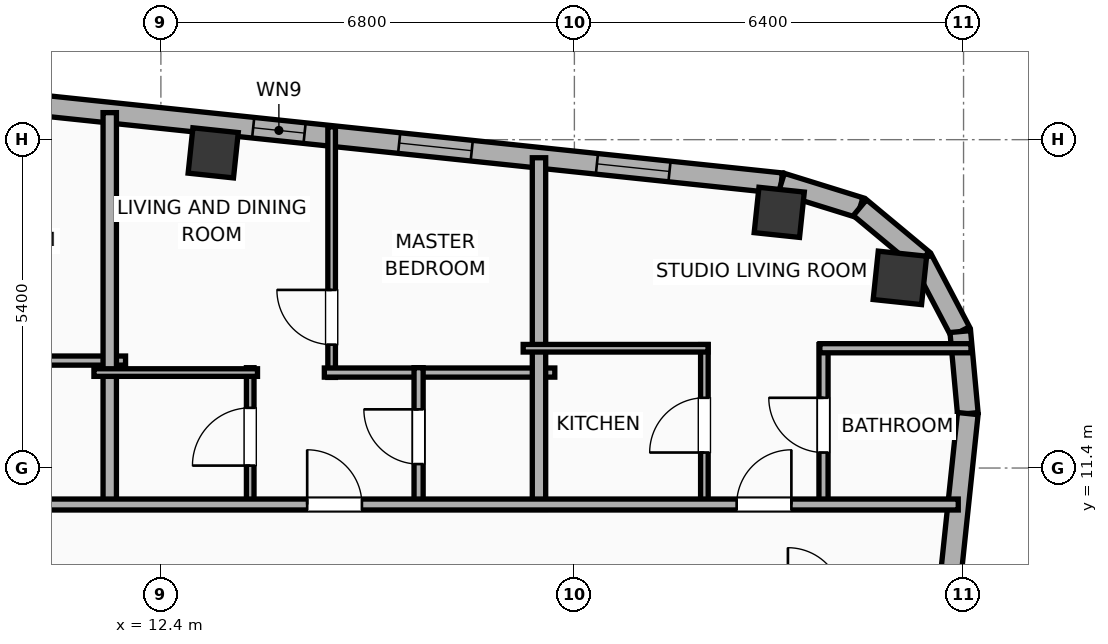
"""IFC4 building model, lengths in metres.
Left out: names, types, materials, properties, quantities, classifications, styles, units other than length and angle.
Written with IfcOpenShell. Run it as: python <this file> out.ifc"""

import sys

from ifc_helpers import new_model, si_unit, direction, frame, frame_2d, origin, origin_2d, place, context, subcontext, project, spatial, rectangle, hollow_rectangle, hollow_circle, extrude, element, fill, save


model = new_model("IFC4")
c1 = context("Model", 3, precision=1e-05, world=origin(), true_north=direction((0.0, 1.0)))
c2 = subcontext(c1, "Body", "Model", "MODEL_VIEW")
j1 = project(units=[si_unit("LENGTHUNIT", "METRE"), si_unit("PLANEANGLEUNIT", "RADIAN")], contexts=[c1])
p1 = place(None, origin())
s1 = spatial("IfcSite", under=j1, at=p1, CompositionType="ELEMENT")
p2 = place(p1, origin())
s2 = spatial("IfcBuilding", under=s1, at=p2, CompositionType="ELEMENT")
p3 = place(p2, frame((0.0, 0.0, 275.6)))
s3 = spatial("IfcBuildingStorey", under=s2, at=p3, CompositionType="ELEMENT", Elevation=275.6)
p4 = place(p3, frame((24.553, 14.527, 0.0), z_axis=(0.0, 0.0, 1.0), x_axis=(0.994521895368, -0.104528463268, 0.0)))
e1 = element("IfcColumn", 1, at=p4, inside=s3, PredefinedType="COLUMN", context=c2, shape_type="SweptSolid", body=[
    extrude(hollow_circle(Radius=0.4, WallThickness=0.028, at=origin_2d()), origin(), (0.0, 0.0, 1.0), 3.9),
])
for number, where, z_axis, x_axis in (
    (2, (22.569, 15.604, 0.0), (0.0, 0.0, 1.0), (0.995, -0.105, 0.0)),
    (3, (13.26, 16.583, 0.0), (0.0, 0.0, 1.0), (0.995, -0.105, 0.0)),
):
    element("IfcColumn", number, at=place(p3, frame(where, z_axis=z_axis, x_axis=x_axis)), inside=s3, PredefinedType="COLUMN", context=c2, shape_type="SweptSolid", body=[
        extrude(hollow_rectangle(XDim=0.75, YDim=0.75, WallThickness=0.025, at=origin_2d()), origin(), (0.0, 0.0, 1.0), 3.9),
    ])
p5 = place(p3, frame((6.789, 17.746, 0.0), z_axis=(0.0, 0.0, 1.0), x_axis=(0.994521594531, -0.104531325504, 0.0)))
e4 = element("IfcWall", 4, at=p5, inside=s3, PredefinedType="ELEMENTEDWALL", context=c2, shape_type="SweptSolid", body=[
    extrude(rectangle(XDim=15.901, YDim=0.34, at=frame_2d((7.95, 0.0))), origin(), (0.0, 0.0, 1.0), 3.65),
])
p6 = place(p5, frame((2.484, 0.0, 0.75)))
e5 = element("IfcOpeningElement", 5, at=p6, cuts=e4, PredefinedType="OPENING", context=c2, shape_type="SweptSolid", body=[
    extrude(rectangle(XDim=1.2, YDim=2.05, at=frame_2d((0.6, 1.025))), frame((0.0, 0.18, 0.0), z_axis=(0.0, -1.0, 0.0), x_axis=(1.0, 0.0, 0.0)), (0.0, 0.0, 1.0), 0.36),
])
p7 = place(p5, frame((7.168, 0.0, 0.75)))
e6 = element("IfcOpeningElement", 6, at=p7, cuts=e4, PredefinedType="OPENING", context=c2, shape_type="SweptSolid", body=[
    extrude(rectangle(XDim=0.85, YDim=2.05, at=frame_2d((0.425, 1.025))), frame((0.0, 0.18, 0.0), z_axis=(0.0, -1.0, 0.0), x_axis=(1.0, 0.0, 0.0)), (0.0, 0.0, 1.0), 0.36),
])
p8 = place(p5, frame((9.582, 0.0, 0.75)))
e7 = element("IfcOpeningElement", 7, at=p8, cuts=e4, PredefinedType="OPENING", context=c2, shape_type="SweptSolid", body=[
    extrude(rectangle(XDim=1.2, YDim=2.05, at=frame_2d((0.6, 1.025))), frame((0.0, 0.18, 0.0), z_axis=(0.0, -1.0, 0.0), x_axis=(1.0, 0.0, 0.0)), (0.0, 0.0, 1.0), 0.36),
])
p9 = place(p5, frame((12.852, 0.0, 0.75)))
e8 = element("IfcOpeningElement", 8, at=p9, cuts=e4, PredefinedType="OPENING", context=c2, shape_type="SweptSolid", body=[
    extrude(rectangle(XDim=1.2, YDim=2.05, at=frame_2d((0.6, 1.025))), frame((0.0, 0.18, 0.0), z_axis=(0.0, -1.0, 0.0), x_axis=(1.0, 0.0, 0.0)), (0.0, 0.0, 1.0), 0.36),
])
p10 = place(p3, frame((22.603, 16.084, 0.0), z_axis=(0.0, 0.0, 1.0), x_axis=(0.955007802701, -0.296580674994, 0.0)))
e9 = element("IfcWall", 9, at=p10, inside=s3, PredefinedType="ELEMENTEDWALL", context=c2, shape_type="SweptSolid", body=[
    extrude(rectangle(XDim=1.354, YDim=0.34, at=frame_2d((0.677, 0.0))), origin(), (0.0, 0.0, 1.0), 3.65),
])
for number, where, z_axis, x_axis in (
    (10, (23.896, 15.682, 0.0), (0.0, 0.0, 1.0), (0.769, -0.64, 0.0)),
    (11, (24.924, 14.827, 0.0), (0.0, 0.0, 1.0), (0.466, -0.885, 0.0)),
):
    element("IfcWall", number, at=place(p3, frame(where, z_axis=z_axis, x_axis=x_axis)), inside=s3, PredefinedType="ELEMENTEDWALL", context=c2, shape_type="SweptSolid", body=[
        extrude(rectangle(XDim=1.337, YDim=0.34, at=frame_2d((0.668, 0.0))), origin(), (0.0, 0.0, 1.0), 3.65),
    ])
p11 = place(p3, frame((25.546, 13.644, 0.0), z_axis=(0.0, 0.0, 1.0), x_axis=(0.091592370975, -0.995796584438, 0.0)))
e12 = element("IfcWall", 12, at=p11, inside=s3, PredefinedType="ELEMENTEDWALL", context=c2, shape_type="SweptSolid", body=[
    extrude(rectangle(XDim=1.354, YDim=0.34, at=frame_2d((0.677, 0.0))), origin(), (0.0, 0.0, 1.0), 3.65),
])
p12 = place(p3, frame((25.67, 12.296, 0.0), z_axis=(0.0, 0.0, 1.0), x_axis=(-0.104540767082, -0.994520602108, 0.0)))
e13 = element("IfcWall", 13, at=p12, inside=s3, PredefinedType="ELEMENTEDWALL", context=c2, shape_type="SweptSolid", body=[
    extrude(rectangle(XDim=10.325, YDim=0.34, at=frame_2d((5.162, 0.0))), origin(), (0.0, 0.0, 1.0), 3.65),
])
p13 = place(p12, frame((4.262, 0.0, 0.75)))
e14 = element("IfcOpeningElement", 14, at=p13, cuts=e13, PredefinedType="OPENING", context=c2, shape_type="SweptSolid", body=[
    extrude(rectangle(XDim=1.8, YDim=2.1, at=frame_2d((0.9, 1.05))), frame((0.0, 0.18, 0.0), z_axis=(0.0, -1.0, 0.0), x_axis=(1.0, 0.0, 0.0)), (0.0, 0.0, 1.0), 0.36),
])
p14 = place(p3, frame((8.029, 13.167, 0.0), z_axis=(0.0, 0.0, 1.0), x_axis=(1.0, 0.0, 0.0)))
e15 = element("IfcWall", 15, at=p14, inside=s3, PredefinedType="PLUMBINGWALL", context=c2, shape_type="SweptSolid", body=[
    extrude(rectangle(XDim=3.79, YDim=0.15, at=frame_2d((1.895, 0.0))), origin(), (0.0, 0.0, 1.0), 3.65),
])
p15 = place(p3, frame((11.559, 10.72, 0.0), z_axis=(0.0, 0.0, 1.0), x_axis=(0.0, 1.0, 0.0)))
e16 = element("IfcWall", 16, at=p15, inside=s3, PredefinedType="PARTITIONING", context=c2, shape_type="SweptSolid", body=[
    extrude(rectangle(XDim=6.524, YDim=0.22, at=frame_2d((3.262, 0.0))), origin(), (0.0, 0.0, 1.0), 3.65),
])
p16 = place(p3, frame((15.208, 12.89, 0.0), z_axis=(0.0, 0.0, 1.0), x_axis=(0.0, 1.0, 0.0)))
e17 = element("IfcWall", 17, at=p16, inside=s3, PredefinedType="PARTITIONING", context=c2, shape_type="SweptSolid", body=[
    extrude(rectangle(XDim=4.122, YDim=0.125, at=frame_2d((2.061, 0.0))), origin(), (0.0, 0.0, 1.0), 3.65),
])
p17 = place(p16, frame((0.539, 0.0, 0.0)))
e18 = element("IfcOpeningElement", 18, at=p17, cuts=e17, PredefinedType="OPENING", context=c2, shape_type="SweptSolid", body=[
    extrude(rectangle(XDim=0.9, YDim=2.05, at=frame_2d((0.45, 1.025))), frame((0.0, 0.073, 0.0), z_axis=(0.0, -1.0, 0.0), x_axis=(1.0, 0.0, 0.0)), (0.0, 0.0, 1.0), 0.145),
])
p18 = place(p3, frame((15.088, 12.97, 0.0), z_axis=(0.0, 0.0, 1.0), x_axis=(1.0, 0.0, 0.0)))
e19 = element("IfcWall", 19, at=p18, inside=s3, PredefinedType="PLUMBINGWALL", context=c2, shape_type="SweptSolid", body=[
    extrude(rectangle(XDim=3.79, YDim=0.15, at=frame_2d((1.895, 0.0))), origin(), (0.0, 0.0, 1.0), 3.65),
])
p19 = place(p3, frame((13.869, 10.78, 0.0), z_axis=(0.0, 0.0, 1.0), x_axis=(0.0, 1.0, 0.0)))
e20 = element("IfcWall", 20, at=p19, inside=s3, PredefinedType="PARTITIONING", context=c2, shape_type="SweptSolid", body=[
    extrude(rectangle(XDim=2.27, YDim=0.125, at=frame_2d((1.135, 0.0))), origin(), (0.0, 0.0, 1.0), 3.65),
])
p20 = place(p19, frame((0.66, 0.0, 0.0)))
e21 = element("IfcOpeningElement", 21, at=p20, cuts=e20, PredefinedType="OPENING", context=c2, shape_type="SweptSolid", body=[
    extrude(rectangle(XDim=0.95, YDim=2.05, at=frame_2d((0.475, 1.025))), frame((0.0, 0.073, 0.0), z_axis=(0.0, -1.0, 0.0), x_axis=(1.0, 0.0, 0.0)), (0.0, 0.0, 1.0), 0.145),
])
p21 = place(p3, frame((11.299, 12.97, 0.0), z_axis=(0.0, 0.0, 1.0), x_axis=(1.0, 0.0, 0.0)))
e22 = element("IfcWall", 22, at=p21, inside=s3, PredefinedType="PARTITIONING", context=c2, shape_type="SweptSolid", body=[
    extrude(rectangle(XDim=2.69, YDim=0.125, at=frame_2d((1.345, 0.0))), origin(), (0.0, 0.0, 1.0), 3.65),
])
p22 = place(p3, frame((16.638, 10.78, 0.0), z_axis=(0.0, 0.0, 1.0), x_axis=(0.0, 1.0, 0.0)))
e23 = element("IfcWall", 23, at=p22, inside=s3, PredefinedType="PLUMBINGWALL", context=c2, shape_type="SweptSolid", body=[
    extrude(rectangle(XDim=2.27, YDim=0.15, at=frame_2d((1.135, 0.0))), origin(), (0.0, 0.0, 1.0), 3.65),
])
p23 = place(p22, frame((0.685, 0.0, 0.0)))
e24 = element("IfcOpeningElement", 24, at=p23, cuts=e23, PredefinedType="OPENING", context=c2, shape_type="SweptSolid", body=[
    extrude(rectangle(XDim=0.9, YDim=2.05, at=frame_2d((0.45, 1.025))), frame((0.0, 0.085, 0.0), z_axis=(0.0, -1.0, 0.0), x_axis=(1.0, 0.0, 0.0)), (0.0, 0.0, 1.0), 0.17),
])
p24 = place(p3, frame((18.618, 10.72, 0.0), z_axis=(0.0, 0.0, 1.0), x_axis=(0.0, 1.0, 0.0)))
e25 = element("IfcWall", 25, at=p24, inside=s3, PredefinedType="PARTITIONING", context=c2, shape_type="SweptSolid", body=[
    extrude(rectangle(XDim=5.782, YDim=0.22, at=frame_2d((2.891, 0.0))), origin(), (0.0, 0.0, 1.0), 3.65),
])
p25 = place(p3, frame((21.338, 10.78, 0.0), z_axis=(0.0, 0.0, 1.0), x_axis=(0.0, 1.0, 0.0)))
e26 = element("IfcWall", 26, at=p25, inside=s3, PredefinedType="PARTITIONING", context=c2, shape_type="SweptSolid", body=[
    extrude(rectangle(XDim=2.65, YDim=0.125, at=frame_2d((1.325, 0.0))), origin(), (0.0, 0.0, 1.0), 3.09),
])
p26 = place(p25, frame((0.875, 0.0, 0.0)))
e27 = element("IfcOpeningElement", 27, at=p26, cuts=e26, PredefinedType="OPENING", context=c2, shape_type="SweptSolid", body=[
    extrude(rectangle(XDim=0.9, YDim=2.05, at=frame_2d((0.45, 1.025))), frame((0.0, 0.073, 0.0), z_axis=(0.0, -1.0, 0.0), x_axis=(1.0, 0.0, 0.0)), (0.0, 0.0, 1.0), 0.145),
])
p27 = place(p3, frame((23.297, 10.78, 0.0), z_axis=(0.0, 0.0, 1.0), x_axis=(0.0, 1.0, 0.0)))
e28 = element("IfcWall", 28, at=p27, inside=s3, PredefinedType="PLUMBINGWALL", context=c2, shape_type="SweptSolid", body=[
    extrude(rectangle(XDim=2.65, YDim=0.15, at=frame_2d((1.325, 0.0))), origin(), (0.0, 0.0, 1.0), 3.65),
])
p28 = place(p27, frame((0.875, 0.0, 0.0)))
e29 = element("IfcOpeningElement", 29, at=p28, cuts=e28, PredefinedType="OPENING", context=c2, shape_type="SweptSolid", body=[
    extrude(rectangle(XDim=0.9, YDim=2.05, at=frame_2d((0.45, 1.025))), frame((0.0, 0.085, 0.0), z_axis=(0.0, -1.0, 0.0), x_axis=(1.0, 0.0, 0.0)), (0.0, 0.0, 1.0), 0.17),
])
p29 = place(p3, frame((18.358, 13.37, 0.0), z_axis=(0.0, 0.0, 1.0), x_axis=(1.0, 0.0, 0.0)))
e30 = element("IfcWall", 30, at=p29, inside=s3, PredefinedType="PARTITIONING", context=c2, shape_type="SweptSolid", body=[
    extrude(rectangle(XDim=3.04, YDim=0.125, at=frame_2d((1.52, 0.0))), origin(), (0.0, 0.0, 1.0), 3.65),
])
p30 = place(p3, frame((23.237, 13.37, 0.0), z_axis=(0.0, 0.0, 1.0), x_axis=(1.0, 0.0, 0.0)))
e31 = element("IfcWall", 31, at=p30, inside=s3, PredefinedType="PLUMBINGWALL", context=c2, shape_type="SweptSolid", body=[
    extrude(rectangle(XDim=2.485, YDim=0.15, at=frame_2d((1.242, 0.0))), origin(), (0.0, 0.0, 1.0), 3.65),
])
p31 = place(p3, frame((-28.443, 10.8, 0.0), z_axis=(0.0, 0.0, 1.0), x_axis=(1.0, 0.0, 0.0)))
e32 = element("IfcWall", 32, at=p31, inside=s3, PredefinedType="PARTITIONING", context=c2, shape_type="SweptSolid", body=[
    extrude(rectangle(XDim=53.956, YDim=0.18, at=frame_2d((26.978, 0.0))), origin(), (0.0, 0.0, 1.0), 3.65),
])
p32 = place(p31, frame((3.213, 0.0, 0.0)))
e33 = element("IfcOpeningElement", 33, at=p32, cuts=e32, PredefinedType="OPENING", context=c2, shape_type="SweptSolid", body=[
    extrude(rectangle(XDim=1.15, YDim=2.05, at=frame_2d((0.575, 1.025))), frame((0.0, 0.1, 0.0), z_axis=(0.0, -1.0, 0.0), x_axis=(1.0, 0.0, 0.0)), (0.0, 0.0, 1.0), 0.2),
])
p33 = place(p31, frame((10.556, 0.0, 0.0)))
e34 = element("IfcOpeningElement", 34, at=p33, cuts=e32, PredefinedType="OPENING", context=c2, shape_type="SweptSolid", body=[
    extrude(rectangle(XDim=1.15, YDim=2.05, at=frame_2d((0.575, 1.025))), frame((0.0, 0.1, 0.0), z_axis=(0.0, -1.0, 0.0), x_axis=(1.0, 0.0, 0.0)), (0.0, 0.0, 1.0), 0.2),
])
p34 = place(p31, frame((17.872, 0.0, 0.0)))
e35 = element("IfcOpeningElement", 35, at=p34, cuts=e32, PredefinedType="OPENING", context=c2, shape_type="SweptSolid", body=[
    extrude(rectangle(XDim=1.15, YDim=2.05, at=frame_2d((0.575, 1.025))), frame((0.0, 0.1, 0.0), z_axis=(0.0, -1.0, 0.0), x_axis=(1.0, 0.0, 0.0)), (0.0, 0.0, 1.0), 0.2),
])
p35 = place(p31, frame((24.45, 0.0, 0.0)))
e36 = element("IfcOpeningElement", 36, at=p35, cuts=e32, PredefinedType="OPENING", context=c2, shape_type="SweptSolid", body=[
    extrude(rectangle(XDim=0.9, YDim=2.05, at=frame_2d((0.45, 1.025))), frame((0.0, 0.1, 0.0), z_axis=(0.0, -1.0, 0.0), x_axis=(1.0, 0.0, 0.0)), (0.0, 0.0, 1.0), 0.2),
])
p36 = place(p31, frame((29.954, 0.0, 0.0)))
e37 = element("IfcOpeningElement", 37, at=p36, cuts=e32, PredefinedType="OPENING", context=c2, shape_type="SweptSolid", body=[
    extrude(rectangle(XDim=0.9, YDim=2.05, at=frame_2d((0.45, 1.025))), frame((0.0, 0.1, 0.0), z_axis=(0.0, -1.0, 0.0), x_axis=(1.0, 0.0, 0.0)), (0.0, 0.0, 1.0), 0.2),
])
p37 = place(p31, frame((36.186, 0.0, 0.0)))
e38 = element("IfcOpeningElement", 38, at=p37, cuts=e32, PredefinedType="OPENING", context=c2, shape_type="SweptSolid", body=[
    extrude(rectangle(XDim=0.9, YDim=2.05, at=frame_2d((0.45, 1.025))), frame((0.0, 0.1, 0.0), z_axis=(0.0, -1.0, 0.0), x_axis=(1.0, 0.0, 0.0)), (0.0, 0.0, 1.0), 0.2),
])
p38 = place(p31, frame((43.249, 0.0, 0.0)))
e39 = element("IfcOpeningElement", 39, at=p38, cuts=e32, PredefinedType="OPENING", context=c2, shape_type="SweptSolid", body=[
    extrude(rectangle(XDim=0.9, YDim=2.05, at=frame_2d((0.45, 1.025))), frame((0.0, 0.1, 0.0), z_axis=(0.0, -1.0, 0.0), x_axis=(1.0, 0.0, 0.0)), (0.0, 0.0, 1.0), 0.2),
])
p39 = place(p31, frame((50.311, 0.0, 0.0)))
e40 = element("IfcOpeningElement", 40, at=p39, cuts=e32, PredefinedType="OPENING", context=c2, shape_type="SweptSolid", body=[
    extrude(rectangle(XDim=0.9, YDim=2.05, at=frame_2d((0.45, 1.025))), frame((0.0, 0.1, 0.0), z_axis=(0.0, -1.0, 0.0), x_axis=(1.0, 0.0, 0.0)), (0.0, 0.0, 1.0), 0.2),
])
p40 = place(p7, origin())
e41 = element("IfcWindow", 41, at=p40, inside=s3, PartitioningType="SINGLE_PANEL", PredefinedType="WINDOW", context=c2, shape_type="SweptSolid", body=[
    extrude(rectangle(XDim=0.85, YDim=2.05, at=frame_2d((0.425, 1.025))), frame((0.0, 0.03, 0.0), z_axis=(0.0, -1.0, 0.0), x_axis=(1.0, 0.0, 0.0)), (0.0, 0.0, 1.0), 0.06),
])
fill(e6, e41)
p41 = place(p8, origin())
e42 = element("IfcWindow", 42, at=p41, inside=s3, PartitioningType="SINGLE_PANEL", PredefinedType="WINDOW", context=c2, shape_type="SweptSolid", body=[
    extrude(rectangle(XDim=1.2, YDim=2.05, at=frame_2d((0.6, 1.025))), frame((0.0, 0.03, 0.0), z_axis=(0.0, -1.0, 0.0), x_axis=(1.0, 0.0, 0.0)), (0.0, 0.0, 1.0), 0.06),
])
fill(e7, e42)
p42 = place(p9, origin())
e43 = element("IfcWindow", 43, at=p42, inside=s3, PartitioningType="SINGLE_PANEL", PredefinedType="WINDOW", context=c2, shape_type="SweptSolid", body=[
    extrude(rectangle(XDim=1.2, YDim=2.05, at=frame_2d((0.6, 1.025))), frame((0.0, 0.03, 0.0), z_axis=(0.0, -1.0, 0.0), x_axis=(1.0, 0.0, 0.0)), (0.0, 0.0, 1.0), 0.06),
])
fill(e8, e43)
p43 = place(p17, origin())
e44 = element("IfcDoor", 44, at=p43, inside=s3, OperationType="SINGLE_SWING_RIGHT", PredefinedType="DOOR", context=c2, shape_type="SweptSolid", body=[
    extrude(rectangle(XDim=0.9, YDim=2.05, at=frame_2d((0.45, 1.025))), frame((0.0, 0.025, 0.0), z_axis=(0.0, -1.0, 0.0), x_axis=(1.0, 0.0, 0.0)), (0.0, 0.0, 1.0), 0.05),
])
fill(e18, e44)
p44 = place(p20, origin())
e45 = element("IfcDoor", 45, at=p44, inside=s3, OperationType="SINGLE_SWING_LEFT", PredefinedType="DOOR", context=c2, shape_type="SweptSolid", body=[
    extrude(rectangle(XDim=0.95, YDim=2.05, at=frame_2d((0.475, 1.025))), frame((0.0, 0.025, 0.0), z_axis=(0.0, -1.0, 0.0), x_axis=(1.0, 0.0, 0.0)), (0.0, 0.0, 1.0), 0.05),
])
fill(e21, e45)
p45 = place(p23, origin())
e46 = element("IfcDoor", 46, at=p45, inside=s3, OperationType="SINGLE_SWING_RIGHT", PredefinedType="DOOR", context=c2, shape_type="SweptSolid", body=[
    extrude(rectangle(XDim=0.9, YDim=2.05, at=frame_2d((0.45, 1.025))), frame((0.0, 0.025, 0.0), z_axis=(0.0, -1.0, 0.0), x_axis=(1.0, 0.0, 0.0)), (0.0, 0.0, 1.0), 0.05),
])
fill(e24, e46)
p46 = place(p26, origin())
e47 = element("IfcDoor", 47, at=p46, inside=s3, OperationType="SINGLE_SWING_LEFT", PredefinedType="DOOR", context=c2, shape_type="SweptSolid", body=[
    extrude(rectangle(XDim=0.9, YDim=2.05, at=frame_2d((0.45, 1.025))), frame((0.0, 0.025, 0.0), z_axis=(0.0, -1.0, 0.0), x_axis=(1.0, 0.0, 0.0)), (0.0, 0.0, 1.0), 0.05),
])
fill(e27, e47)
p47 = place(p28, origin())
e48 = element("IfcDoor", 48, at=p47, inside=s3, OperationType="SINGLE_SWING_RIGHT", PredefinedType="DOOR", context=c2, shape_type="SweptSolid", body=[
    extrude(rectangle(XDim=0.9, YDim=2.05, at=frame_2d((0.45, 1.025))), frame((0.0, 0.025, 0.0), z_axis=(0.0, -1.0, 0.0), x_axis=(1.0, 0.0, 0.0)), (0.0, 0.0, 1.0), 0.05),
])
fill(e29, e48)
p48 = place(p38, origin())
e49 = element("IfcDoor", 49, at=p48, inside=s3, OperationType="SINGLE_SWING_LEFT", PredefinedType="DOOR", context=c2, shape_type="SweptSolid", body=[
    extrude(rectangle(XDim=0.9, YDim=2.05, at=frame_2d((0.45, 1.025))), frame((0.0, 0.025, 0.0), z_axis=(0.0, -1.0, 0.0), x_axis=(1.0, 0.0, 0.0)), (0.0, 0.0, 1.0), 0.05),
])
fill(e39, e49)
p49 = place(p39, origin())
e50 = element("IfcDoor", 50, at=p49, inside=s3, OperationType="SINGLE_SWING_RIGHT", PredefinedType="DOOR", context=c2, shape_type="SweptSolid", body=[
    extrude(rectangle(XDim=0.9, YDim=2.05, at=frame_2d((0.45, 1.025))), frame((0.0, 0.025, 0.0), z_axis=(0.0, -1.0, 0.0), x_axis=(1.0, 0.0, 0.0)), (0.0, 0.0, 1.0), 0.05),
])
fill(e40, e50)
save(model, sys.argv[1])
